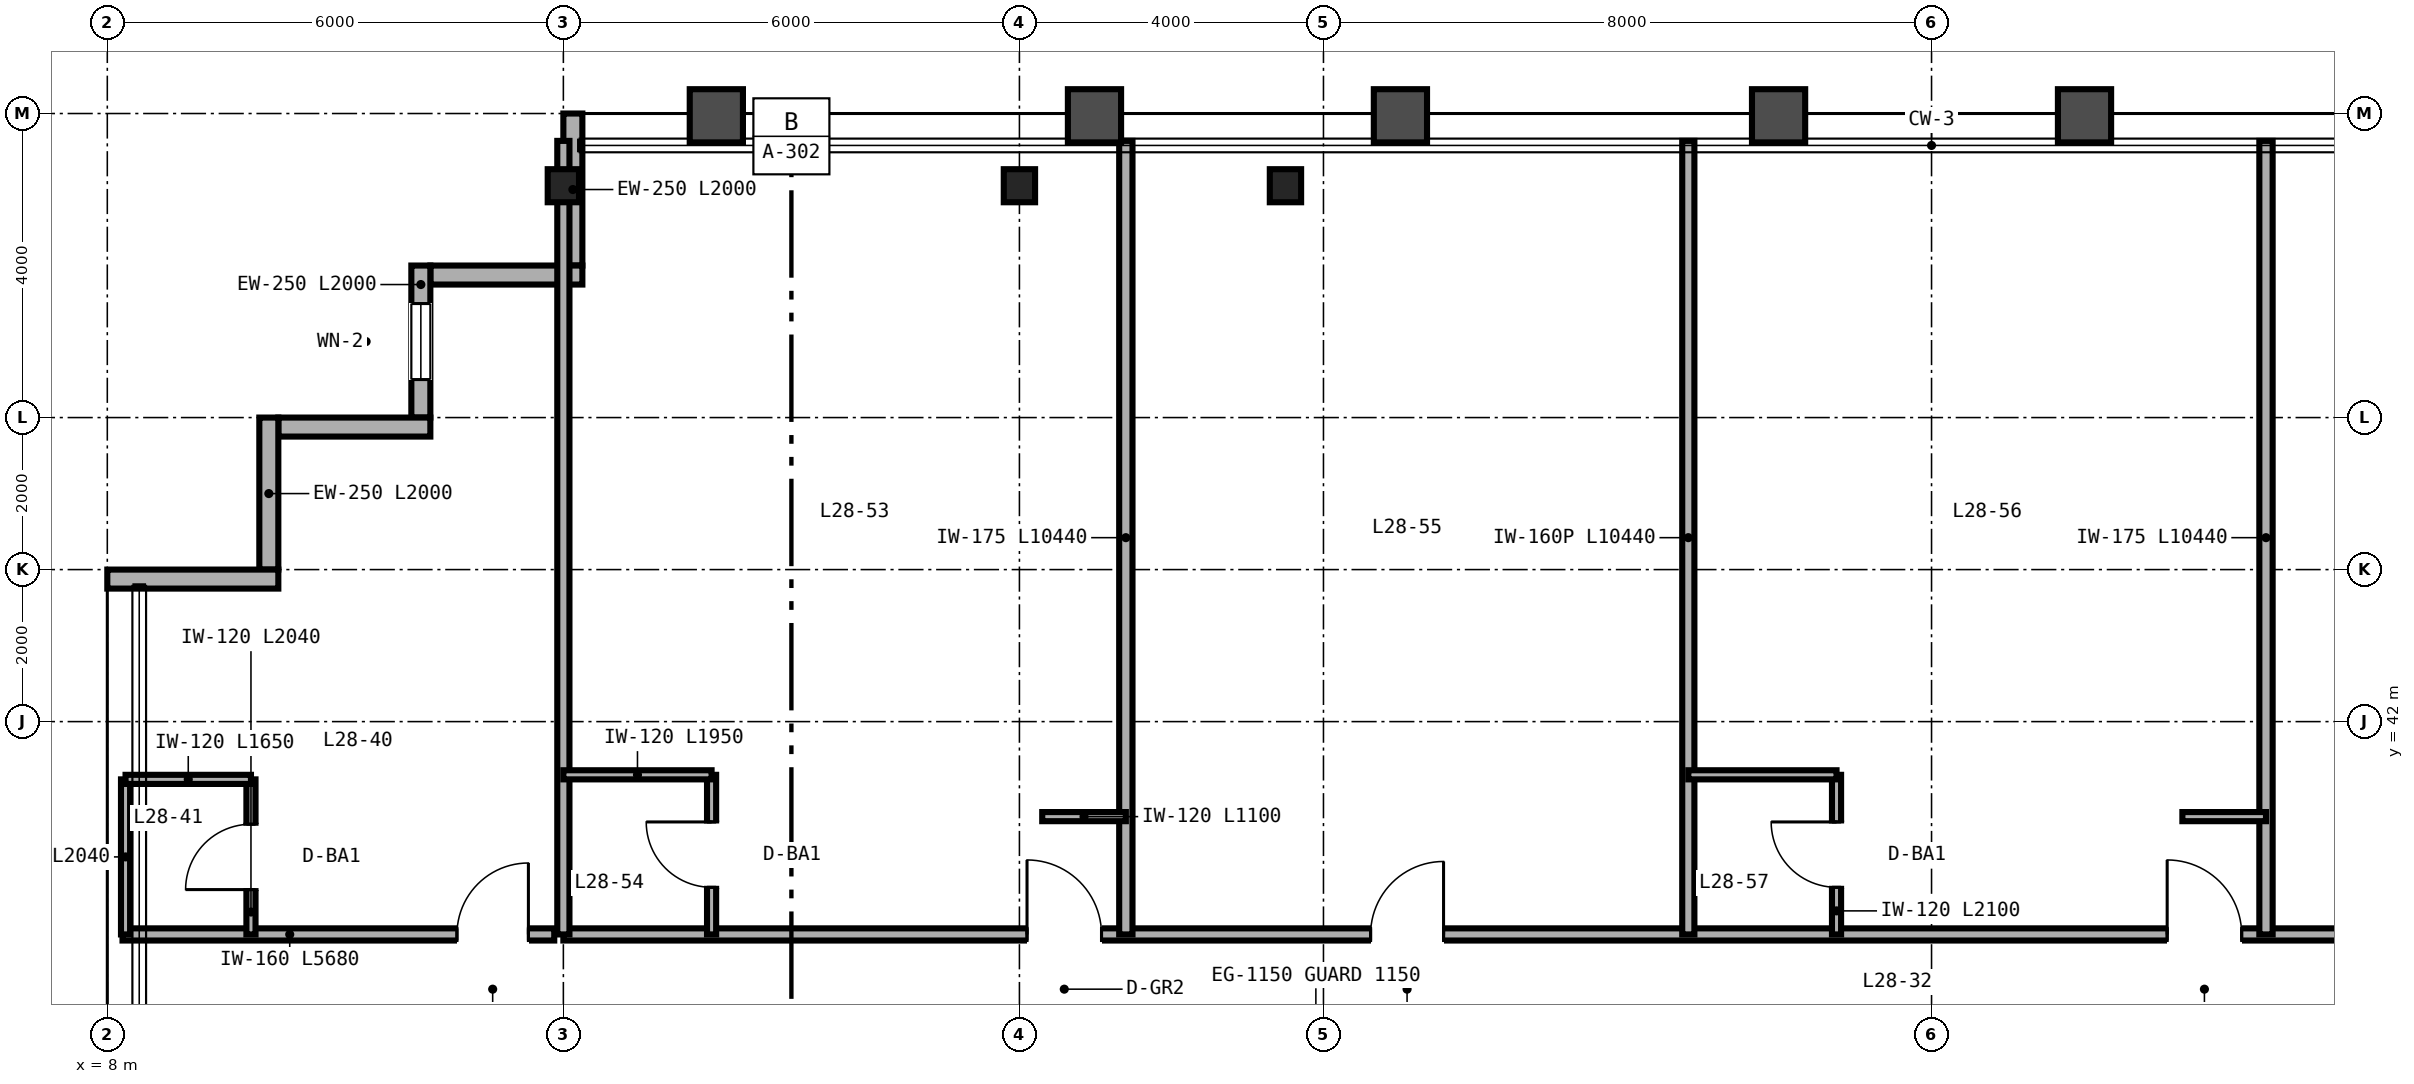
"""IFC4 building model, lengths in metres.
Left out: names, types, materials, properties, quantities, classifications, styles, units other than length and angle.
Written with IfcOpenShell. Run it as: python <this file> out.ifc"""

import sys

from ifc_helpers import new_model, si_unit, direction, frame, frame_2d, origin, origin_2d, place, context, subcontext, project, spatial, rectangle, i_section, extrude, source, transform, mapped, element, fill, save


model = new_model("IFC4")
c1 = context("Model", 3, precision=1e-05, world=origin(), true_north=direction((0.0, 1.0)))
c2 = subcontext(c1, "Body", "Model", "MODEL_VIEW")
j1 = project(units=[si_unit("LENGTHUNIT", "METRE"), si_unit("PLANEANGLEUNIT", "RADIAN")], contexts=[c1])
p1 = place(None, origin())
s1 = spatial("IfcSite", under=j1, at=p1, CompositionType="ELEMENT")
p2 = place(p1, origin())
s2 = spatial("IfcBuilding", under=s1, at=p2, CompositionType="ELEMENT")
p3 = place(p2, frame((0.0, 0.0, 115.2)))
s3 = spatial("IfcBuildingStorey", under=s2, at=p3, CompositionType="ELEMENT", Elevation=115.2)
m1 = source(origin(), c2, "Body", "SweptSolid", [
    extrude(i_section(OverallWidth=0.412, OverallDepth=0.435, WebThickness=0.036, FlangeThickness=0.057, FilletRadius=0.025, at=origin_2d()), origin(), (0.0, 0.0, 1.0), 3.36),
])
for number, where, z_axis, x_axis in (
    (1, (14.0, 49.05, 0.0), (0.0, 0.0, 1.0), (1.0, 0.0, 0.0)),
    (2, (20.0, 49.05, 0.0), (0.0, 0.0, 1.0), (1.0, 0.0, 0.0)),
    (3, (23.5, 49.05, 0.0), (0.0, 0.0, 1.0), (1.0, 0.0, 0.0)),
):
    element("IfcColumn", number, at=place(p3, frame(where, z_axis=z_axis, x_axis=x_axis)), inside=s3, PredefinedType="COLUMN", context=c2, shape_type="MappedRepresentation", body=[
        mapped(m1, transform((0.0, 0.0, 0.0), scale=1.0)),
    ])
p4 = place(p3, frame((14.125, 50.0, 0.0), z_axis=(0.0, 0.0, 1.0), x_axis=(0.0, -1.0, 0.0)))
e4 = element("IfcWall", 4, at=p4, inside=s3, PredefinedType="SOLIDWALL", context=c2, shape_type="SweptSolid", body=[
    extrude(rectangle(XDim=2.0, YDim=0.25, at=frame_2d((1.0, 0.0))), origin(), (0.0, 0.0, 1.0), 2.667),
])
p5 = place(p3, frame((14.25, 47.875, 0.0), z_axis=(0.0, 0.0, 1.0), x_axis=(-1.0, 0.0, 0.0)))
e5 = element("IfcWall", 5, at=p5, inside=s3, PredefinedType="SOLIDWALL", context=c2, shape_type="SweptSolid", body=[
    extrude(rectangle(XDim=2.0, YDim=0.25, at=frame_2d((1.0, 0.0))), origin(), (0.0, 0.0, 1.0), 3.36),
])
p6 = place(p3, frame((12.125, 48.0, 0.0), z_axis=(0.0, 0.0, 1.0), x_axis=(0.0, -1.0, 0.0)))
e6 = element("IfcWall", 6, at=p6, inside=s3, PredefinedType="SOLIDWALL", context=c2, shape_type="SweptSolid", body=[
    extrude(rectangle(XDim=2.0, YDim=0.25, at=frame_2d((1.0, 0.0))), origin(), (0.0, 0.0, 1.0), 3.36),
])
p7 = place(p6, frame((0.5, 0.0, 0.85)))
e7 = element("IfcOpeningElement", 7, at=p7, cuts=e6, PredefinedType="OPENING", context=c2, shape_type="SweptSolid", body=[
    extrude(rectangle(XDim=1.0, YDim=1.9, at=frame_2d((0.5, 0.95))), frame((0.0, 0.135, 0.0), z_axis=(0.0, -1.0, 0.0), x_axis=(1.0, 0.0, 0.0)), (0.0, 0.0, 1.0), 0.27),
])
for number, where, z_axis, x_axis in (
    (8, (12.25, 45.875, 0.0), (0.0, 0.0, 1.0), (-1.0, 0.0, 0.0)),
    (9, (10.125, 46.0, 0.0), (0.0, 0.0, 1.0), (0.0, -1.0, 0.0)),
):
    element("IfcWall", number, at=place(p3, frame(where, z_axis=z_axis, x_axis=x_axis)), inside=s3, PredefinedType="SOLIDWALL", context=c2, shape_type="SweptSolid", body=[
        extrude(rectangle(XDim=2.0, YDim=0.25, at=frame_2d((1.0, 0.0))), origin(), (0.0, 0.0, 1.0), 3.36),
    ])
p8 = place(p3, frame((10.25, 43.875, 0.0), z_axis=(0.0, 0.0, 1.0), x_axis=(-1.0, 0.0, 0.0)))
e10 = element("IfcWall", 10, at=p8, inside=s3, PredefinedType="SOLIDWALL", context=c2, shape_type="SweptSolid", body=[
    extrude(rectangle(XDim=2.25, YDim=0.25, at=frame_2d((1.125, 0.0))), origin(), (0.0, 0.0, 1.0), 3.36),
])
p9 = place(p3, frame((8.2, 39.2, 0.0), z_axis=(0.0, 0.0, 1.0), x_axis=(1.0, 0.0, 0.0)))
e11 = element("IfcWall", 11, at=p9, inside=s3, PredefinedType="PARTITIONING", context=c2, shape_type="SweptSolid", body=[
    extrude(rectangle(XDim=5.68, YDim=0.16, at=frame_2d((2.84, 0.0))), origin(), (0.0, 0.0, 1.0), 3.36),
])
p10 = place(p9, frame((4.4, 0.0, 0.0)))
e12 = element("IfcOpeningElement", 12, at=p10, cuts=e11, PredefinedType="OPENING", context=c2, shape_type="SweptSolid", body=[
    extrude(rectangle(XDim=0.94, YDim=2.15, at=frame_2d((0.47, 1.075))), frame((0.0, 0.09, 0.0), z_axis=(0.0, -1.0, 0.0), x_axis=(1.0, 0.0, 0.0)), (0.0, 0.0, 1.0), 0.18),
])
p11 = place(p3, frame((9.89, 39.2, 0.0), z_axis=(0.0, 0.0, 1.0), x_axis=(0.0, 1.0, 0.0)))
e13 = element("IfcWall", 13, at=p11, inside=s3, PredefinedType="PARTITIONING", context=c2, shape_type="SweptSolid", body=[
    extrude(rectangle(XDim=2.04, YDim=0.12, at=frame_2d((1.02, 0.0))), origin(), (0.0, 0.0, 1.0), 3.36),
])
p12 = place(p11, frame((0.59, 0.0, 0.0)))
e14 = element("IfcOpeningElement", 14, at=p12, cuts=e13, PredefinedType="OPENING", context=c2, shape_type="SweptSolid", body=[
    extrude(rectangle(XDim=0.86, YDim=2.1, at=frame_2d((0.43, 1.05))), frame((0.0, 0.07, 0.0), z_axis=(0.0, -1.0, 0.0), x_axis=(1.0, 0.0, 0.0)), (0.0, 0.0, 1.0), 0.14),
])
p13 = place(p3, frame((8.24, 39.2, 0.0), z_axis=(0.0, 0.0, 1.0), x_axis=(0.0, 1.0, 0.0)))
e15 = element("IfcWall", 15, at=p13, inside=s3, PredefinedType="PARTITIONING", context=c2, shape_type="SweptSolid", body=[
    extrude(rectangle(XDim=2.04, YDim=0.12, at=frame_2d((1.02, 0.0))), origin(), (0.0, 0.0, 1.0), 3.36),
])
p14 = place(p3, frame((8.24, 41.24, 0.0), z_axis=(0.0, 0.0, 1.0), x_axis=(1.0, 0.0, 0.0)))
e16 = element("IfcWall", 16, at=p14, inside=s3, PredefinedType="PARTITIONING", context=c2, shape_type="SweptSolid", body=[
    extrude(rectangle(XDim=1.65, YDim=0.12, at=frame_2d((0.825, 0.0))), origin(), (0.0, 0.0, 1.0), 3.36),
])
p15 = place(p3, frame((14.0, 39.2, 0.0), z_axis=(0.0, 0.0, 1.0), x_axis=(1.0, 0.0, 0.0)))
e17 = element("IfcWall", 17, at=p15, inside=s3, PredefinedType="PARTITIONING", context=c2, shape_type="SweptSolid", body=[
    extrude(rectangle(XDim=36.0, YDim=0.16, at=frame_2d((18.0, 0.0))), origin(), (0.0, 0.0, 1.0), 2.581),
])
p16 = place(p15, frame((6.1, 0.0, 0.0)))
e18 = element("IfcOpeningElement", 18, at=p16, cuts=e17, PredefinedType="OPENING", context=c2, shape_type="SweptSolid", body=[
    extrude(rectangle(XDim=0.98, YDim=2.2, at=frame_2d((0.49, 1.1))), frame((0.0, 0.09, 0.0), z_axis=(0.0, -1.0, 0.0), x_axis=(1.0, 0.0, 0.0)), (0.0, 0.0, 1.0), 0.18),
])
p17 = place(p15, frame((10.62, 0.0, 0.0)))
e19 = element("IfcOpeningElement", 19, at=p17, cuts=e17, PredefinedType="OPENING", context=c2, shape_type="SweptSolid", body=[
    extrude(rectangle(XDim=0.96, YDim=2.15, at=frame_2d((0.48, 1.075))), frame((0.0, 0.09, 0.0), z_axis=(0.0, -1.0, 0.0), x_axis=(1.0, 0.0, 0.0)), (0.0, 0.0, 1.0), 0.18),
])
p18 = place(p15, frame((21.1, 0.0, 0.0)))
e20 = element("IfcOpeningElement", 20, at=p18, cuts=e17, PredefinedType="OPENING", context=c2, shape_type="SweptSolid", body=[
    extrude(rectangle(XDim=0.98, YDim=2.2, at=frame_2d((0.49, 1.1))), frame((0.0, 0.09, 0.0), z_axis=(0.0, -1.0, 0.0), x_axis=(1.0, 0.0, 0.0)), (0.0, 0.0, 1.0), 0.18),
])
p19 = place(p15, frame((24.84, 0.0, 0.0)))
e21 = element("IfcOpeningElement", 21, at=p19, cuts=e17, PredefinedType="OPENING", context=c2, shape_type="SweptSolid", body=[
    extrude(rectangle(XDim=0.96, YDim=2.15, at=frame_2d((0.48, 1.075))), frame((0.0, 0.09, 0.0), z_axis=(0.0, -1.0, 0.0), x_axis=(1.0, 0.0, 0.0)), (0.0, 0.0, 1.0), 0.18),
])
p20 = place(p15, frame((34.74, 0.0, 0.0)))
e22 = element("IfcOpeningElement", 22, at=p20, cuts=e17, PredefinedType="OPENING", context=c2, shape_type="SweptSolid", body=[
    extrude(rectangle(XDim=0.94, YDim=2.15, at=frame_2d((0.47, 1.075))), frame((0.0, 0.09, 0.0), z_axis=(0.0, -1.0, 0.0), x_axis=(1.0, 0.0, 0.0)), (0.0, 0.0, 1.0), 0.18),
])
p21 = place(p3, frame((14.0, 39.2, 0.0), z_axis=(0.0, 0.0, 1.0), x_axis=(0.0, 1.0, 0.0)))
e23 = element("IfcWall", 23, at=p21, inside=s3, PredefinedType="PARTITIONING", context=c2, shape_type="SweptSolid", body=[
    extrude(rectangle(XDim=10.44, YDim=0.16, at=frame_2d((5.22, 0.0))), origin(), (0.0, 0.0, 1.0), 2.667),
])
p22 = place(p3, frame((21.4, 39.2, 0.0), z_axis=(0.0, 0.0, 1.0), x_axis=(0.0, 1.0, 0.0)))
e24 = element("IfcWall", 24, at=p22, inside=s3, PredefinedType="PARTITIONING", context=c2, shape_type="SweptSolid", body=[
    extrude(rectangle(XDim=10.44, YDim=0.175, at=frame_2d((5.22, 0.0))), origin(), (0.0, 0.0, 1.0), 2.823),
])
p23 = place(p3, frame((15.95, 39.2, 0.0), z_axis=(0.0, 0.0, 1.0), x_axis=(0.0, 1.0, 0.0)))
e25 = element("IfcWall", 25, at=p23, inside=s3, PredefinedType="PARTITIONING", context=c2, shape_type="SweptSolid", body=[
    extrude(rectangle(XDim=2.1, YDim=0.12, at=frame_2d((1.05, 0.0))), origin(), (0.0, 0.0, 1.0), 3.36),
])
p24 = place(p23, frame((0.62, 0.0, 0.0)))
e26 = element("IfcOpeningElement", 26, at=p24, cuts=e25, PredefinedType="OPENING", context=c2, shape_type="SweptSolid", body=[
    extrude(rectangle(XDim=0.86, YDim=2.1, at=frame_2d((0.43, 1.05))), frame((0.0, 0.07, 0.0), z_axis=(0.0, -1.0, 0.0), x_axis=(1.0, 0.0, 0.0)), (0.0, 0.0, 1.0), 0.14),
])
p25 = place(p3, frame((14.0, 41.3, 0.0), z_axis=(0.0, 0.0, 1.0), x_axis=(1.0, 0.0, 0.0)))
e27 = element("IfcWall", 27, at=p25, inside=s3, PredefinedType="PARTITIONING", context=c2, shape_type="SweptSolid", body=[
    extrude(rectangle(XDim=1.95, YDim=0.12, at=frame_2d((0.975, 0.0))), origin(), (0.0, 0.0, 1.0), 3.36),
])
p26 = place(p3, frame((20.3, 40.75, 0.0), z_axis=(0.0, 0.0, 1.0), x_axis=(1.0, 0.0, 0.0)))
e28 = element("IfcWall", 28, at=p26, inside=s3, PredefinedType="PARTITIONING", context=c2, shape_type="SweptSolid", body=[
    extrude(rectangle(XDim=1.1, YDim=0.12, at=frame_2d((0.55, 0.0))), origin(), (0.0, 0.0, 1.0), 3.36),
])
p27 = place(p3, frame((28.8, 39.2, 0.0), z_axis=(0.0, 0.0, 1.0), x_axis=(0.0, 1.0, 0.0)))
e29 = element("IfcWall", 29, at=p27, inside=s3, PredefinedType="PARTITIONING", context=c2, shape_type="SweptSolid", body=[
    extrude(rectangle(XDim=10.44, YDim=0.16, at=frame_2d((5.22, 0.0))), origin(), (0.0, 0.0, 1.0), 2.433),
])
p28 = place(p3, frame((36.4, 39.2, 0.0), z_axis=(0.0, 0.0, 1.0), x_axis=(0.0, 1.0, 0.0)))
e30 = element("IfcWall", 30, at=p28, inside=s3, PredefinedType="PARTITIONING", context=c2, shape_type="SweptSolid", body=[
    extrude(rectangle(XDim=10.44, YDim=0.175, at=frame_2d((5.22, 0.0))), origin(), (0.0, 0.0, 1.0), 2.433),
])
p29 = place(p3, frame((30.75, 39.2, 0.0), z_axis=(0.0, 0.0, 1.0), x_axis=(0.0, 1.0, 0.0)))
e31 = element("IfcWall", 31, at=p29, inside=s3, PredefinedType="PARTITIONING", context=c2, shape_type="SweptSolid", body=[
    extrude(rectangle(XDim=2.1, YDim=0.12, at=frame_2d((1.05, 0.0))), origin(), (0.0, 0.0, 1.0), 3.36),
])
p30 = place(p29, frame((0.62, 0.0, 0.0)))
e32 = element("IfcOpeningElement", 32, at=p30, cuts=e31, PredefinedType="OPENING", context=c2, shape_type="SweptSolid", body=[
    extrude(rectangle(XDim=0.86, YDim=2.1, at=frame_2d((0.43, 1.05))), frame((0.0, 0.07, 0.0), z_axis=(0.0, -1.0, 0.0), x_axis=(1.0, 0.0, 0.0)), (0.0, 0.0, 1.0), 0.14),
])
p31 = place(p3, frame((28.8, 41.3, 0.0), z_axis=(0.0, 0.0, 1.0), x_axis=(1.0, 0.0, 0.0)))
e33 = element("IfcWall", 33, at=p31, inside=s3, PredefinedType="PARTITIONING", context=c2, shape_type="SweptSolid", body=[
    extrude(rectangle(XDim=1.95, YDim=0.12, at=frame_2d((0.975, 0.0))), origin(), (0.0, 0.0, 1.0), 3.36),
])
p32 = place(p3, frame((35.3, 40.75, 0.0), z_axis=(0.0, 0.0, 1.0), x_axis=(1.0, 0.0, 0.0)))
e34 = element("IfcWall", 34, at=p32, inside=s3, PredefinedType="PARTITIONING", context=c2, shape_type="SweptSolid", body=[
    extrude(rectangle(XDim=1.1, YDim=0.12, at=frame_2d((0.55, 0.0))), origin(), (0.0, 0.0, 1.0), 3.36),
])
m2 = source(origin(), c2, "Body", "SweptSolid", [
    extrude(rectangle(XDim=1.0, YDim=1.9, at=frame_2d((0.5, 0.95))), frame((0.0, 0.03, 0.0), z_axis=(0.0, -1.0, 0.0), x_axis=(1.0, 0.0, 0.0)), (0.0, 0.0, 1.0), 0.06),
])
p33 = place(p7, origin())
e35 = element("IfcWindow", 35, at=p33, inside=s3, PartitioningType="SINGLE_PANEL", PredefinedType="WINDOW", context=c2, shape_type="MappedRepresentation", body=[
    mapped(m2, transform((0.0, 0.0, 0.0), scale=1.0)),
])
fill(e7, e35)
m3 = source(origin(), c2, "Body", "SweptSolid", [
    extrude(rectangle(XDim=0.86, YDim=2.1, at=frame_2d((0.43, 1.05))), frame((0.0, 0.025, 0.0), z_axis=(0.0, -1.0, 0.0), x_axis=(1.0, 0.0, 0.0)), (0.0, 0.0, 1.0), 0.05),
])
p34 = place(p12, origin())
e36 = element("IfcDoor", 36, at=p34, inside=s3, OperationType="SINGLE_SWING_LEFT", PredefinedType="DOOR", context=c2, shape_type="MappedRepresentation", body=[
    mapped(m3, transform((0.0, 0.0, 0.0), scale=1.0)),
])
fill(e14, e36)
m4 = source(origin(), c2, "Body", "SweptSolid", [
    extrude(rectangle(XDim=0.94, YDim=2.15, at=frame_2d((0.47, 1.075))), frame((0.0, 0.025, 0.0), z_axis=(0.0, -1.0, 0.0), x_axis=(1.0, 0.0, 0.0)), (0.0, 0.0, 1.0), 0.05),
])
p35 = place(p10, origin())
e37 = element("IfcDoor", 37, at=p35, inside=s3, OperationType="SINGLE_SWING_RIGHT", PredefinedType="DOOR", context=c2, shape_type="MappedRepresentation", body=[
    mapped(m4, transform((0.0, 0.0, 0.0), scale=1.0)),
])
fill(e12, e37)
p36 = place(p24, origin())
e38 = element("IfcDoor", 38, at=p36, inside=s3, OperationType="SINGLE_SWING_RIGHT", PredefinedType="DOOR", context=c2, shape_type="MappedRepresentation", body=[
    mapped(m3, transform((0.0, 0.0, 0.0), scale=1.0)),
])
fill(e26, e38)
p37 = place(p30, origin())
e39 = element("IfcDoor", 39, at=p37, inside=s3, OperationType="SINGLE_SWING_RIGHT", PredefinedType="DOOR", context=c2, shape_type="MappedRepresentation", body=[
    mapped(m3, transform((0.0, 0.0, 0.0), scale=1.0)),
])
fill(e32, e39)
m5 = source(origin(), c2, "Body", "SweptSolid", [
    extrude(rectangle(XDim=0.98, YDim=2.2, at=frame_2d((0.49, 1.1))), frame((0.0, 0.025, 0.0), z_axis=(0.0, -1.0, 0.0), x_axis=(1.0, 0.0, 0.0)), (0.0, 0.0, 1.0), 0.05),
])
p38 = place(p16, origin())
e40 = element("IfcDoor", 40, at=p38, inside=s3, OperationType="SINGLE_SWING_LEFT", PredefinedType="DOOR", context=c2, shape_type="MappedRepresentation", body=[
    mapped(m5, transform((0.0, 0.0, 0.0), scale=1.0)),
])
fill(e18, e40)
m6 = source(origin(), c2, "Body", "SweptSolid", [
    extrude(rectangle(XDim=0.96, YDim=2.15, at=frame_2d((0.48, 1.075))), frame((0.0, 0.025, 0.0), z_axis=(0.0, -1.0, 0.0), x_axis=(1.0, 0.0, 0.0)), (0.0, 0.0, 1.0), 0.05),
])
p39 = place(p17, origin())
e41 = element("IfcDoor", 41, at=p39, inside=s3, OperationType="SINGLE_SWING_RIGHT", PredefinedType="DOOR", context=c2, shape_type="MappedRepresentation", body=[
    mapped(m6, transform((0.0, 0.0, 0.0), scale=1.0)),
])
fill(e19, e41)
p40 = place(p18, origin())
e42 = element("IfcDoor", 42, at=p40, inside=s3, OperationType="SINGLE_SWING_LEFT", PredefinedType="DOOR", context=c2, shape_type="MappedRepresentation", body=[
    mapped(m5, transform((0.0, 0.0, 0.0), scale=1.0)),
])
fill(e20, e42)
save(model, sys.argv[1])
